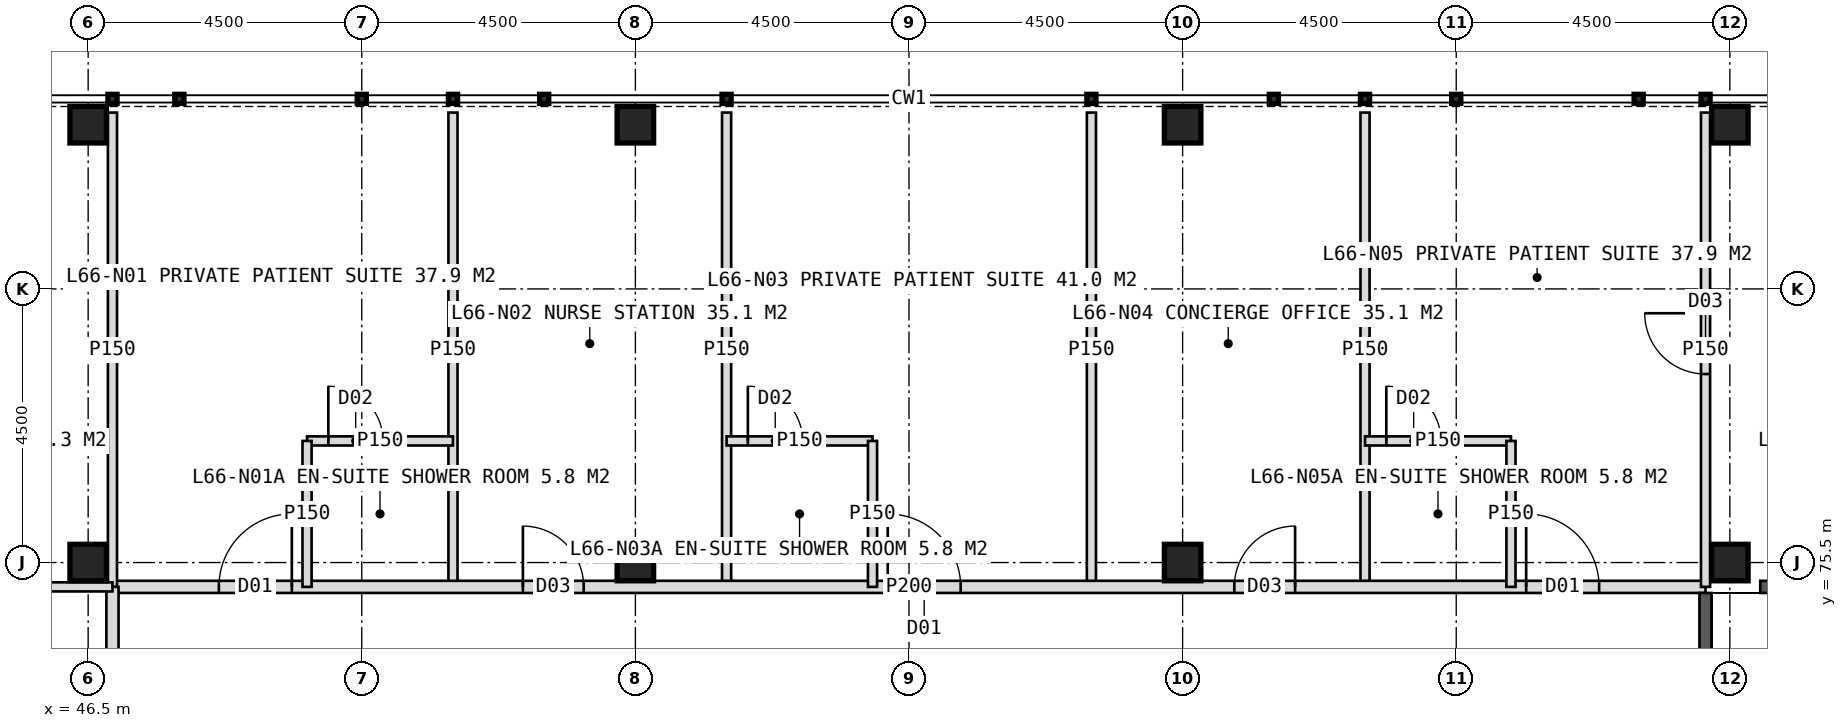
"""IFC4 building model, lengths in metres.
Left out: names, types, materials, properties, quantities, classifications, styles, units other than length and angle.
Written with IfcOpenShell. Run it as: python <this file> out.ifc"""

import sys

from ifc_helpers import new_model, si_unit, direction, frame, frame_2d, origin, origin_2d, place, context, subcontext, project, spatial, rectangle, hollow_rectangle, extrude, element, fill, save


model = new_model("IFC4")
c1 = context("Model", 3, precision=1e-05, world=origin(), true_north=direction((0.0, 1.0)))
c2 = subcontext(c1, "Body", "Model", "MODEL_VIEW")
j1 = project(units=[si_unit("LENGTHUNIT", "METRE"), si_unit("PLANEANGLEUNIT", "RADIAN")], contexts=[c1])
p1 = place(None, origin())
s1 = spatial("IfcSite", under=j1, at=p1, CompositionType="ELEMENT")
p2 = place(p1, origin())
s2 = spatial("IfcBuilding", under=s1, at=p2, CompositionType="ELEMENT")
p3 = place(p2, frame((0.0, 0.0, 274.0)))
s3 = spatial("IfcBuildingStorey", under=s2, at=p3, CompositionType="ELEMENT", Elevation=274.0)
for number, where, z_axis, x_axis in (
    (1, (73.5, 75.5, 0.0), (0.0, 0.0, 1.0), (1.0, 0.0, 0.0)),
    (2, (46.5, 75.5, 0.0), (0.0, 0.0, 1.0), (1.0, 0.0, 0.0)),
    (3, (55.5, 75.5, 0.0), (0.0, 0.0, 1.0), (1.0, 0.0, 0.0)),
    (4, (64.5, 75.5, 0.0), (0.0, 0.0, 1.0), (1.0, 0.0, 0.0)),
    (5, (46.5, 82.7, 0.0), (0.0, 0.0, 1.0), (1.0, 0.0, 0.0)),
    (6, (55.5, 82.7, 0.0), (0.0, 0.0, 1.0), (1.0, 0.0, 0.0)),
    (7, (64.5, 82.7, 0.0), (0.0, 0.0, 1.0), (1.0, 0.0, 0.0)),
    (8, (73.5, 82.7, 0.0), (0.0, 0.0, 1.0), (1.0, 0.0, 0.0)),
):
    element("IfcColumn", number, at=place(p3, frame(where, z_axis=z_axis, x_axis=x_axis)), inside=s3, PredefinedType="COLUMN", context=c2, shape_type="SweptSolid", body=[
        extrude(hollow_rectangle(XDim=0.6, YDim=0.6, WallThickness=0.04, at=origin_2d()), origin(), (0.0, 0.0, 1.0), 4.0),
    ])
for number, where, z_axis, x_axis in (
    (9, (52.5, 75.1, 0.0), (0.0, 0.0, 1.0), (0.0, 1.0, 0.0)),
    (10, (57.0, 75.1, 0.0), (0.0, 0.0, 1.0), (0.0, 1.0, 0.0)),
    (11, (63.0, 75.1, 0.0), (0.0, 0.0, 1.0), (0.0, 1.0, 0.0)),
    (12, (67.5, 75.1, 0.0), (0.0, 0.0, 1.0), (0.0, 1.0, 0.0)),
):
    element("IfcWall", number, at=place(p3, frame(where, z_axis=z_axis, x_axis=x_axis)), inside=s3, PredefinedType="PARTITIONING", context=c2, shape_type="SweptSolid", body=[
        extrude(rectangle(XDim=7.8, YDim=0.15, at=frame_2d((3.9, 0.0))), origin(), (0.0, 0.0, 1.0), 3.75),
    ])
p4 = place(p3, frame((46.9, 75.1, 0.0), z_axis=(0.0, 0.0, 1.0), x_axis=(1.0, 0.0, 0.0)))
e13 = element("IfcWall", 13, at=p4, inside=s3, PredefinedType="PARTITIONING", context=c2, shape_type="SweptSolid", body=[
    extrude(rectangle(XDim=26.2, YDim=0.2, at=frame_2d((13.1, 0.0))), origin(), (0.0, 0.0, 1.0), 3.75),
])
p5 = place(p4, frame((1.75, 0.0, 0.0)))
e14 = element("IfcOpeningElement", 14, at=p5, cuts=e13, PredefinedType="OPENING", context=c2, shape_type="SweptSolid", body=[
    extrude(rectangle(XDim=1.2, YDim=2.2, at=frame_2d((0.6, 1.1))), frame((0.0, 0.11, 0.0), z_axis=(0.0, -1.0, 0.0), x_axis=(1.0, 0.0, 0.0)), (0.0, 0.0, 1.0), 0.22),
])
p6 = place(p4, frame((6.75, 0.0, 0.0)))
e15 = element("IfcOpeningElement", 15, at=p6, cuts=e13, PredefinedType="OPENING", context=c2, shape_type="SweptSolid", body=[
    extrude(rectangle(XDim=1.0, YDim=2.1, at=frame_2d((0.5, 1.05))), frame((0.0, 0.11, 0.0), z_axis=(0.0, -1.0, 0.0), x_axis=(1.0, 0.0, 0.0)), (0.0, 0.0, 1.0), 0.22),
])
p7 = place(p4, frame((12.75, 0.0, 0.0)))
e16 = element("IfcOpeningElement", 16, at=p7, cuts=e13, PredefinedType="OPENING", context=c2, shape_type="SweptSolid", body=[
    extrude(rectangle(XDim=1.2, YDim=2.2, at=frame_2d((0.6, 1.1))), frame((0.0, 0.11, 0.0), z_axis=(0.0, -1.0, 0.0), x_axis=(1.0, 0.0, 0.0)), (0.0, 0.0, 1.0), 0.22),
])
p8 = place(p4, frame((18.45, 0.0, 0.0)))
e17 = element("IfcOpeningElement", 17, at=p8, cuts=e13, PredefinedType="OPENING", context=c2, shape_type="SweptSolid", body=[
    extrude(rectangle(XDim=1.0, YDim=2.1, at=frame_2d((0.5, 1.05))), frame((0.0, 0.11, 0.0), z_axis=(0.0, -1.0, 0.0), x_axis=(1.0, 0.0, 0.0)), (0.0, 0.0, 1.0), 0.22),
])
p9 = place(p4, frame((23.25, 0.0, 0.0)))
e18 = element("IfcOpeningElement", 18, at=p9, cuts=e13, PredefinedType="OPENING", context=c2, shape_type="SweptSolid", body=[
    extrude(rectangle(XDim=1.2, YDim=2.2, at=frame_2d((0.6, 1.1))), frame((0.0, 0.11, 0.0), z_axis=(0.0, -1.0, 0.0), x_axis=(1.0, 0.0, 0.0)), (0.0, 0.0, 1.0), 0.22),
])
p10 = place(p3, frame((46.9, 75.1, 0.0), z_axis=(0.0, 0.0, 1.0), x_axis=(0.0, 1.0, 0.0)))
e19 = element("IfcWall", 19, at=p10, inside=s3, PredefinedType="PARTITIONING", context=c2, shape_type="SweptSolid", body=[
    extrude(rectangle(XDim=7.8, YDim=0.15, at=frame_2d((3.9, 0.0))), origin(), (0.0, 0.0, 1.0), 3.75),
])
p11 = place(p3, frame((50.1, 77.5, 0.0), z_axis=(0.0, 0.0, 1.0), x_axis=(1.0, 0.0, 0.0)))
e20 = element("IfcWall", 20, at=p11, inside=s3, PredefinedType="PARTITIONING", context=c2, shape_type="SweptSolid", body=[
    extrude(rectangle(XDim=2.4, YDim=0.15, at=frame_2d((1.2, 0.0))), origin(), (0.0, 0.0, 1.0), 3.75),
])
p12 = place(p11, frame((0.35, 0.0, 0.0)))
e21 = element("IfcOpeningElement", 21, at=p12, cuts=e20, PredefinedType="OPENING", context=c2, shape_type="SweptSolid", body=[
    extrude(rectangle(XDim=0.9, YDim=2.1, at=frame_2d((0.45, 1.05))), frame((0.0, 0.085, 0.0), z_axis=(0.0, -1.0, 0.0), x_axis=(1.0, 0.0, 0.0)), (0.0, 0.0, 1.0), 0.17),
])
p13 = place(p3, frame((50.1, 75.1, 0.0), z_axis=(0.0, 0.0, 1.0), x_axis=(0.0, 1.0, 0.0)))
e22 = element("IfcWall", 22, at=p13, inside=s3, PredefinedType="PARTITIONING", context=c2, shape_type="SweptSolid", body=[
    extrude(rectangle(XDim=2.4, YDim=0.15, at=frame_2d((1.2, 0.0))), origin(), (0.0, 0.0, 1.0), 3.75),
])
p14 = place(p3, frame((57.0, 77.5, 0.0), z_axis=(0.0, 0.0, 1.0), x_axis=(1.0, 0.0, 0.0)))
e23 = element("IfcWall", 23, at=p14, inside=s3, PredefinedType="PARTITIONING", context=c2, shape_type="SweptSolid", body=[
    extrude(rectangle(XDim=2.4, YDim=0.15, at=frame_2d((1.2, 0.0))), origin(), (0.0, 0.0, 1.0), 3.75),
])
p15 = place(p14, frame((0.35, 0.0, 0.0)))
e24 = element("IfcOpeningElement", 24, at=p15, cuts=e23, PredefinedType="OPENING", context=c2, shape_type="SweptSolid", body=[
    extrude(rectangle(XDim=0.9, YDim=2.1, at=frame_2d((0.45, 1.05))), frame((0.0, 0.085, 0.0), z_axis=(0.0, -1.0, 0.0), x_axis=(1.0, 0.0, 0.0)), (0.0, 0.0, 1.0), 0.17),
])
p16 = place(p3, frame((59.4, 75.1, 0.0), z_axis=(0.0, 0.0, 1.0), x_axis=(0.0, 1.0, 0.0)))
e25 = element("IfcWall", 25, at=p16, inside=s3, PredefinedType="PARTITIONING", context=c2, shape_type="SweptSolid", body=[
    extrude(rectangle(XDim=2.4, YDim=0.15, at=frame_2d((1.2, 0.0))), origin(), (0.0, 0.0, 1.0), 3.75),
])
p17 = place(p3, frame((73.1, 75.1, 0.0), z_axis=(0.0, 0.0, 1.0), x_axis=(0.0, 1.0, 0.0)))
e26 = element("IfcWall", 26, at=p17, inside=s3, PredefinedType="PARTITIONING", context=c2, shape_type="SweptSolid", body=[
    extrude(rectangle(XDim=7.8, YDim=0.15, at=frame_2d((3.9, 0.0))), origin(), (0.0, 0.0, 1.0), 3.75),
])
p18 = place(p17, frame((3.5, 0.0, 0.0)))
e27 = element("IfcOpeningElement", 27, at=p18, cuts=e26, PredefinedType="OPENING", context=c2, shape_type="SweptSolid", body=[
    extrude(rectangle(XDim=1.0, YDim=2.1, at=frame_2d((0.5, 1.05))), frame((0.0, 0.085, 0.0), z_axis=(0.0, -1.0, 0.0), x_axis=(1.0, 0.0, 0.0)), (0.0, 0.0, 1.0), 0.17),
])
p19 = place(p3, frame((67.5, 77.5, 0.0), z_axis=(0.0, 0.0, 1.0), x_axis=(1.0, 0.0, 0.0)))
e28 = element("IfcWall", 28, at=p19, inside=s3, PredefinedType="PARTITIONING", context=c2, shape_type="SweptSolid", body=[
    extrude(rectangle(XDim=2.4, YDim=0.15, at=frame_2d((1.2, 0.0))), origin(), (0.0, 0.0, 1.0), 3.75),
])
p20 = place(p19, frame((0.35, 0.0, 0.0)))
e29 = element("IfcOpeningElement", 29, at=p20, cuts=e28, PredefinedType="OPENING", context=c2, shape_type="SweptSolid", body=[
    extrude(rectangle(XDim=0.9, YDim=2.1, at=frame_2d((0.45, 1.05))), frame((0.0, 0.085, 0.0), z_axis=(0.0, -1.0, 0.0), x_axis=(1.0, 0.0, 0.0)), (0.0, 0.0, 1.0), 0.17),
])
p21 = place(p3, frame((69.9, 75.1, 0.0), z_axis=(0.0, 0.0, 1.0), x_axis=(0.0, 1.0, 0.0)))
e30 = element("IfcWall", 30, at=p21, inside=s3, PredefinedType="PARTITIONING", context=c2, shape_type="SweptSolid", body=[
    extrude(rectangle(XDim=2.4, YDim=0.15, at=frame_2d((1.2, 0.0))), origin(), (0.0, 0.0, 1.0), 3.75),
])
p22 = place(p3, frame((46.9, 48.9, 0.0), z_axis=(0.0, 0.0, 1.0), x_axis=(0.0, 1.0, 0.0)))
e31 = element("IfcWall", 31, at=p22, inside=s3, PredefinedType="PARTITIONING", context=c2, shape_type="SweptSolid", body=[
    extrude(rectangle(XDim=26.2, YDim=0.2, at=frame_2d((13.1, 0.0))), origin(), (0.0, 0.0, 1.0), 3.75),
])
p23 = place(p22, frame((1.75, 0.0, 0.0)))
e32 = element("IfcOpeningElement", 32, at=p23, cuts=e31, PredefinedType="OPENING", context=c2, shape_type="SweptSolid", body=[
    extrude(rectangle(XDim=1.2, YDim=2.2, at=frame_2d((0.6, 1.1))), frame((0.0, 0.11, 0.0), z_axis=(0.0, -1.0, 0.0), x_axis=(1.0, 0.0, 0.0)), (0.0, 0.0, 1.0), 0.22),
])
p24 = place(p22, frame((6.75, 0.0, 0.0)))
e33 = element("IfcOpeningElement", 33, at=p24, cuts=e31, PredefinedType="OPENING", context=c2, shape_type="SweptSolid", body=[
    extrude(rectangle(XDim=1.0, YDim=2.1, at=frame_2d((0.5, 1.05))), frame((0.0, 0.11, 0.0), z_axis=(0.0, -1.0, 0.0), x_axis=(1.0, 0.0, 0.0)), (0.0, 0.0, 1.0), 0.22),
])
p25 = place(p22, frame((11.1, 0.0, 0.0)))
e34 = element("IfcOpeningElement", 34, at=p25, cuts=e31, PredefinedType="OPENING", context=c2, shape_type="SweptSolid", body=[
    extrude(rectangle(XDim=1.0, YDim=2.1, at=frame_2d((0.5, 1.05))), frame((0.0, 0.11, 0.0), z_axis=(0.0, -1.0, 0.0), x_axis=(1.0, 0.0, 0.0)), (0.0, 0.0, 1.0), 0.22),
])
p26 = place(p22, frame((15.75, 0.0, 0.0)))
e35 = element("IfcOpeningElement", 35, at=p26, cuts=e31, PredefinedType="OPENING", context=c2, shape_type="SweptSolid", body=[
    extrude(rectangle(XDim=1.0, YDim=2.1, at=frame_2d((0.5, 1.05))), frame((0.0, 0.11, 0.0), z_axis=(0.0, -1.0, 0.0), x_axis=(1.0, 0.0, 0.0)), (0.0, 0.0, 1.0), 0.22),
])
p27 = place(p22, frame((23.25, 0.0, 0.0)))
e36 = element("IfcOpeningElement", 36, at=p27, cuts=e31, PredefinedType="OPENING", context=c2, shape_type="SweptSolid", body=[
    extrude(rectangle(XDim=1.2, YDim=2.2, at=frame_2d((0.6, 1.1))), frame((0.0, 0.11, 0.0), z_axis=(0.0, -1.0, 0.0), x_axis=(1.0, 0.0, 0.0)), (0.0, 0.0, 1.0), 0.22),
])
p28 = place(p3, frame((46.9, 75.1, 0.0), z_axis=(0.0, 0.0, 1.0), x_axis=(-1.0, 0.0, 0.0)))
e37 = element("IfcWall", 37, at=p28, inside=s3, PredefinedType="PARTITIONING", context=c2, shape_type="SweptSolid", body=[
    extrude(rectangle(XDim=7.8, YDim=0.15, at=frame_2d((3.9, 0.0))), origin(), (0.0, 0.0, 1.0), 3.75),
])
p29 = place(p28, frame((3.5, 0.0, 0.0)))
e38 = element("IfcOpeningElement", 38, at=p29, cuts=e37, PredefinedType="OPENING", context=c2, shape_type="SweptSolid", body=[
    extrude(rectangle(XDim=1.0, YDim=2.1, at=frame_2d((0.5, 1.05))), frame((0.0, 0.085, 0.0), z_axis=(0.0, -1.0, 0.0), x_axis=(1.0, 0.0, 0.0)), (0.0, 0.0, 1.0), 0.17),
])
p30 = place(p3, frame((73.1, 75.0, 0.0), z_axis=(0.0, 0.0, 1.0), x_axis=(0.0, -1.0, 0.0)))
e39 = element("IfcWall", 39, at=p30, inside=s3, PredefinedType="SOLIDWALL", context=c2, shape_type="SweptSolid", body=[
    extrude(rectangle(XDim=4.0, YDim=0.2, at=frame_2d((2.0, 0.0))), origin(), (0.0, 0.0, 1.0), 3.75),
])
p31 = place(p30, frame((1.5, 0.0, 0.0)))
e40 = element("IfcOpeningElement", 40, at=p31, cuts=e39, PredefinedType="OPENING", context=c2, shape_type="SweptSolid", body=[
    extrude(rectangle(XDim=1.2, YDim=2.1, at=frame_2d((0.6, 1.05))), frame((0.0, 0.11, 0.0), z_axis=(0.0, -1.0, 0.0), x_axis=(1.0, 0.0, 0.0)), (0.0, 0.0, 1.0), 0.22),
])
p32 = place(p3, frame((74.0, 75.1, 0.0), z_axis=(0.0, 0.0, 1.0), x_axis=(1.0, 0.0, 0.0)))
e41 = element("IfcWall", 41, at=p32, inside=s3, PredefinedType="SOLIDWALL", context=c2, shape_type="SweptSolid", body=[
    extrude(rectangle(XDim=6.15, YDim=0.2, at=frame_2d((3.075, 0.0))), origin(), (0.0, 0.0, 1.0), 3.75),
])
p33 = place(p5, origin())
e42 = element("IfcDoor", 42, at=p33, inside=s3, OperationType="SINGLE_SWING_RIGHT", PredefinedType="DOOR", context=c2, shape_type="SweptSolid", body=[
    extrude(rectangle(XDim=1.2, YDim=2.2, at=frame_2d((0.6, 1.1))), frame((0.0, 0.025, 0.0), z_axis=(0.0, -1.0, 0.0), x_axis=(1.0, 0.0, 0.0)), (0.0, 0.0, 1.0), 0.05),
])
fill(e14, e42)
p34 = place(p12, origin())
e43 = element("IfcDoor", 43, at=p34, inside=s3, OperationType="SINGLE_SWING_LEFT", PredefinedType="DOOR", context=c2, shape_type="SweptSolid", body=[
    extrude(rectangle(XDim=0.9, YDim=2.1, at=frame_2d((0.45, 1.05))), frame((0.0, 0.025, 0.0), z_axis=(0.0, -1.0, 0.0), x_axis=(1.0, 0.0, 0.0)), (0.0, 0.0, 1.0), 0.05),
])
fill(e21, e43)
p35 = place(p6, origin())
e44 = element("IfcDoor", 44, at=p35, inside=s3, OperationType="SINGLE_SWING_LEFT", PredefinedType="DOOR", context=c2, shape_type="SweptSolid", body=[
    extrude(rectangle(XDim=1.0, YDim=2.1, at=frame_2d((0.5, 1.05))), frame((0.0, 0.025, 0.0), z_axis=(0.0, -1.0, 0.0), x_axis=(1.0, 0.0, 0.0)), (0.0, 0.0, 1.0), 0.05),
])
fill(e15, e44)
p36 = place(p7, origin())
e45 = element("IfcDoor", 45, at=p36, inside=s3, OperationType="SINGLE_SWING_LEFT", PredefinedType="DOOR", context=c2, shape_type="SweptSolid", body=[
    extrude(rectangle(XDim=1.2, YDim=2.2, at=frame_2d((0.6, 1.1))), frame((0.0, 0.025, 0.0), z_axis=(0.0, -1.0, 0.0), x_axis=(1.0, 0.0, 0.0)), (0.0, 0.0, 1.0), 0.05),
])
fill(e16, e45)
p37 = place(p15, origin())
e46 = element("IfcDoor", 46, at=p37, inside=s3, OperationType="SINGLE_SWING_LEFT", PredefinedType="DOOR", context=c2, shape_type="SweptSolid", body=[
    extrude(rectangle(XDim=0.9, YDim=2.1, at=frame_2d((0.45, 1.05))), frame((0.0, 0.025, 0.0), z_axis=(0.0, -1.0, 0.0), x_axis=(1.0, 0.0, 0.0)), (0.0, 0.0, 1.0), 0.05),
])
fill(e24, e46)
p38 = place(p8, origin())
e47 = element("IfcDoor", 47, at=p38, inside=s3, OperationType="SINGLE_SWING_RIGHT", PredefinedType="DOOR", context=c2, shape_type="SweptSolid", body=[
    extrude(rectangle(XDim=1.0, YDim=2.1, at=frame_2d((0.5, 1.05))), frame((0.0, 0.025, 0.0), z_axis=(0.0, -1.0, 0.0), x_axis=(1.0, 0.0, 0.0)), (0.0, 0.0, 1.0), 0.05),
])
fill(e17, e47)
p39 = place(p18, origin())
e48 = element("IfcDoor", 48, at=p39, inside=s3, OperationType="SINGLE_SWING_RIGHT", PredefinedType="DOOR", context=c2, shape_type="SweptSolid", body=[
    extrude(rectangle(XDim=1.0, YDim=2.1, at=frame_2d((0.5, 1.05))), frame((0.0, 0.025, 0.0), z_axis=(0.0, -1.0, 0.0), x_axis=(1.0, 0.0, 0.0)), (0.0, 0.0, 1.0), 0.05),
])
fill(e27, e48)
p40 = place(p9, origin())
e49 = element("IfcDoor", 49, at=p40, inside=s3, OperationType="SINGLE_SWING_LEFT", PredefinedType="DOOR", context=c2, shape_type="SweptSolid", body=[
    extrude(rectangle(XDim=1.2, YDim=2.2, at=frame_2d((0.6, 1.1))), frame((0.0, 0.025, 0.0), z_axis=(0.0, -1.0, 0.0), x_axis=(1.0, 0.0, 0.0)), (0.0, 0.0, 1.0), 0.05),
])
fill(e18, e49)
p41 = place(p20, origin())
e50 = element("IfcDoor", 50, at=p41, inside=s3, OperationType="SINGLE_SWING_LEFT", PredefinedType="DOOR", context=c2, shape_type="SweptSolid", body=[
    extrude(rectangle(XDim=0.9, YDim=2.1, at=frame_2d((0.45, 1.05))), frame((0.0, 0.025, 0.0), z_axis=(0.0, -1.0, 0.0), x_axis=(1.0, 0.0, 0.0)), (0.0, 0.0, 1.0), 0.05),
])
fill(e29, e50)
save(model, sys.argv[1])
